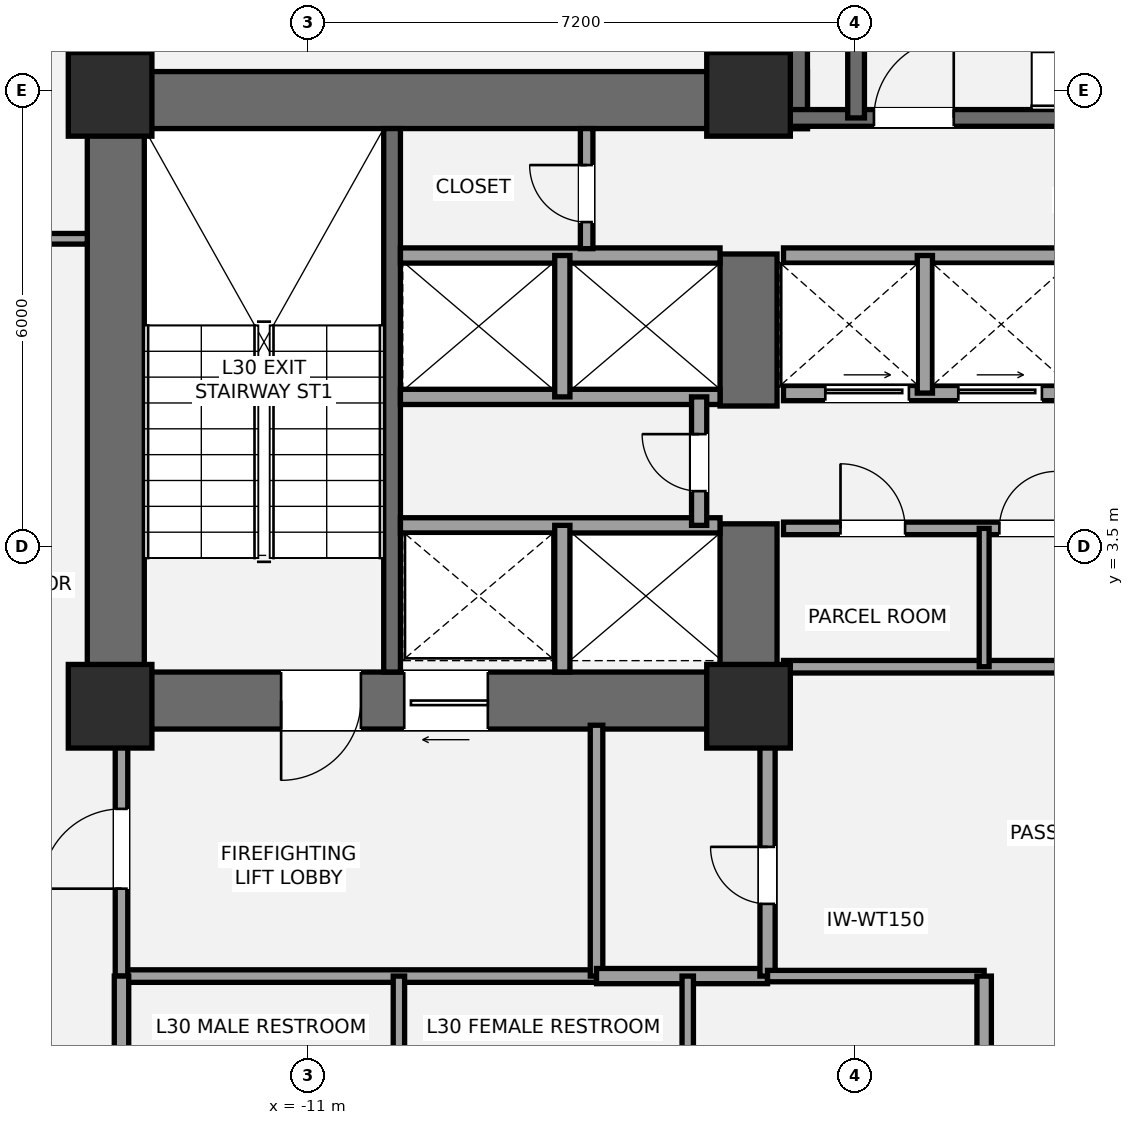
"""IFC4 building model, lengths in metres.
Left out: names, types, materials, properties, quantities, classifications, styles, units other than length and angle.
Written with IfcOpenShell. Run it as: python <this file> out.ifc"""

import sys

from ifc_helpers import new_model, si_unit, direction, frame, frame_2d, origin, origin_2d, place, context, subcontext, project, spatial, rectangle, extrude, element, fill, save


model = new_model("IFC4")
c1 = context("Model", 3, precision=1e-05, world=origin(), true_north=direction((0.0, 1.0)))
c2 = subcontext(c1, "Body", "Model", "MODEL_VIEW")
j1 = project(units=[si_unit("LENGTHUNIT", "METRE"), si_unit("PLANEANGLEUNIT", "RADIAN")], contexts=[c1])
p1 = place(None, origin())
s1 = spatial("IfcSite", under=j1, at=p1, CompositionType="ELEMENT")
p2 = place(p1, origin())
s2 = spatial("IfcBuilding", under=s1, at=p2, CompositionType="ELEMENT")
p3 = place(p2, frame((0.0, 0.0, 114.1)))
s3 = spatial("IfcBuildingStorey", under=s2, at=p3, CompositionType="ELEMENT", Elevation=114.1)
p4 = place(p3, frame((-13.525, 1.1, 0.0), z_axis=(0.0, 0.0, 1.0), x_axis=(0.0, 1.0, 0.0)))
e1 = element("IfcWall", 1, at=p4, inside=s3, PredefinedType="SHEAR", context=c2, shape_type="SweptSolid", body=[
    extrude(rectangle(XDim=8.65, YDim=0.75, at=frame_2d((4.325, 0.0))), origin(), (0.0, 0.0, 1.0), 3.5),
])
p5 = place(p3, frame((-13.9, 9.375, 0.0), z_axis=(0.0, 0.0, 1.0), x_axis=(1.0, 0.0, 0.0)))
e2 = element("IfcWall", 2, at=p5, inside=s3, PredefinedType="SHEAR", context=c2, shape_type="SweptSolid", body=[
    extrude(rectangle(XDim=9.475, YDim=0.75, at=frame_2d((4.737, 0.0))), origin(), (0.0, 0.0, 1.0), 3.5),
])
p6 = place(p3, frame((-4.825, 1.475, 0.0), z_axis=(0.0, 0.0, 1.0), x_axis=(-1.0, 0.0, 0.0)))
e3 = element("IfcWall", 3, at=p6, inside=s3, PredefinedType="SHEAR", context=c2, shape_type="SweptSolid", body=[
    extrude(rectangle(XDim=9.075, YDim=0.75, at=frame_2d((4.538, 0.0))), origin(), (0.0, 0.0, 1.0), 3.5),
])
p7 = place(p6, frame((5.475, 0.0, 0.0)))
e4 = element("IfcOpeningElement", 4, at=p7, cuts=e3, PredefinedType="OPENING", context=c2, shape_type="SweptSolid", body=[
    extrude(rectangle(XDim=1.05, YDim=2.15, at=frame_2d((0.525, 1.075))), frame((0.0, 0.385, 0.0), z_axis=(0.0, -1.0, 0.0), x_axis=(1.0, 0.0, 0.0)), (0.0, 0.0, 1.0), 0.77),
])
p8 = place(p6, frame((3.805, 0.0, 0.0)))
e5 = element("IfcOpeningElement", 5, at=p8, cuts=e3, PredefinedType="OPENING", context=c2, shape_type="SweptSolid", body=[
    extrude(rectangle(XDim=1.1, YDim=2.2, at=frame_2d((0.55, 1.1))), frame((0.0, 0.385, 0.0), z_axis=(0.0, -1.0, 0.0), x_axis=(1.0, 0.0, 0.0)), (0.0, 0.0, 1.0), 0.77),
])
p9 = place(p3, frame((-5.2, 1.1, 0.0), z_axis=(0.0, 0.0, 1.0), x_axis=(0.0, 1.0, 0.0)))
e6 = element("IfcWall", 6, at=p9, inside=s3, PredefinedType="SHEAR", context=c2, shape_type="SweptSolid", body=[
    extrude(rectangle(XDim=2.7, YDim=0.75, at=frame_2d((1.35, 0.0))), origin(), (0.0, 0.0, 1.0), 3.5),
])
p10 = place(p3, frame((-5.2, 5.35, 0.0), z_axis=(0.0, 0.0, 1.0), x_axis=(0.0, 1.0, 0.0)))
e7 = element("IfcWall", 7, at=p10, inside=s3, PredefinedType="SHEAR", context=c2, shape_type="SweptSolid", body=[
    extrude(rectangle(XDim=2.0, YDim=0.75, at=frame_2d((1.0, 0.0))), origin(), (0.0, 0.0, 1.0), 3.5),
])
p11 = place(p3, frame((-9.89, 1.85, 0.0), z_axis=(0.0, 0.0, 1.0), x_axis=(0.0, 1.0, 0.0)))
e8 = element("IfcWall", 8, at=p11, inside=s3, PredefinedType="SHEAR", context=c2, shape_type="SweptSolid", body=[
    extrude(rectangle(XDim=7.15, YDim=0.22, at=frame_2d((3.575, 0.0))), origin(), (0.0, 0.0, 1.0), 3.5),
])
p12 = place(p3, frame((-4.8, 9.0, 0.0), z_axis=(0.0, 0.0, 1.0), x_axis=(0.0, 1.0, 0.0)))
e9 = element("IfcWall", 9, at=p12, inside=s3, PredefinedType="SHEAR", context=c2, shape_type="SweptSolid", body=[
    extrude(rectangle(XDim=4.15, YDim=0.75, at=frame_2d((2.075, 0.0))), origin(), (0.0, 0.0, 1.0), 3.5),
])
p13 = place(p3, frame((-4.7, 9.14, 0.0), z_axis=(0.0, 0.0, 1.0), x_axis=(1.0, 0.0, 0.0)))
e10 = element("IfcWall", 10, at=p13, inside=s3, PredefinedType="SHEAR", context=c2, shape_type="SweptSolid", body=[
    extrude(rectangle(XDim=9.3, YDim=0.22, at=frame_2d((4.65, 0.0))), origin(), (0.0, 0.0, 1.0), 3.5),
])
p14 = place(p13, frame((1.15, 0.0, 0.0)))
e11 = element("IfcOpeningElement", 11, at=p14, cuts=e10, PredefinedType="OPENING", context=c2, shape_type="SweptSolid", body=[
    extrude(rectangle(XDim=1.05, YDim=2.15, at=frame_2d((0.525, 1.075))), frame((0.0, 0.12, 0.0), z_axis=(0.0, -1.0, 0.0), x_axis=(1.0, 0.0, 0.0)), (0.0, 0.0, 1.0), 0.24),
])
p15 = place(p3, frame((-3.785, 9.14, 0.0), z_axis=(0.0, 0.0, 1.0), x_axis=(0.0, 1.0, 0.0)))
e12 = element("IfcWall", 12, at=p15, inside=s3, PredefinedType="SHEAR", context=c2, shape_type="SweptSolid", body=[
    extrude(rectangle(XDim=3.26, YDim=0.22, at=frame_2d((1.63, 0.0))), origin(), (0.0, 0.0, 1.0), 3.5),
])
for number, where, z_axis, x_axis in (
    (13, (-13.6, 1.4, 0.0), (0.0, 0.0, 1.0), (1.0, 0.0, 0.0)),
    (14, (-13.6, 9.45, 0.0), (0.0, 0.0, 1.0), (1.0, 0.0, 0.0)),
    (15, (-5.2, 1.4, 0.0), (0.0, 0.0, 1.0), (1.0, 0.0, 0.0)),
    (16, (-5.2, 9.45, 0.0), (0.0, 0.0, 1.0), (1.0, 0.0, 0.0)),
):
    element("IfcColumn", number, at=place(p3, frame(where, z_axis=z_axis, x_axis=x_axis)), inside=s3, PredefinedType="COLUMN", context=c2, shape_type="SweptSolid", body=[
        extrude(rectangle(XDim=1.1, YDim=1.1, at=origin_2d()), origin(), (0.0, 0.0, 1.0), 3.5),
    ])
p16 = place(p3, frame((-13.45, -2.15, 0.0), z_axis=(0.0, 0.0, 1.0), x_axis=(1.0, 0.0, 0.0)))
e17 = element("IfcWall", 17, at=p16, inside=s3, PredefinedType="PARTITIONING", context=c2, shape_type="SweptSolid", body=[
    extrude(rectangle(XDim=6.25, YDim=0.165, at=frame_2d((3.125, 0.0))), origin(), (0.0, 0.0, 1.0), 3.31),
])
p17 = place(p3, frame((-13.45, -2.15, 0.0), z_axis=(0.0, 0.0, 1.0), x_axis=(0.0, 1.0, 0.0)))
e18 = element("IfcWall", 18, at=p17, inside=s3, PredefinedType="PARTITIONING", context=c2, shape_type="SweptSolid", body=[
    extrude(rectangle(XDim=3.3, YDim=0.165, at=frame_2d((1.65, 0.0))), origin(), (0.0, 0.0, 1.0), 2.763),
])
p18 = place(p17, frame((1.15, 0.0, 0.0)))
e19 = element("IfcOpeningElement", 19, at=p18, cuts=e18, PredefinedType="OPENING", context=c2, shape_type="SweptSolid", body=[
    extrude(rectangle(XDim=1.05, YDim=2.15, at=frame_2d((0.525, 1.075))), frame((0.0, 0.093, 0.0), z_axis=(0.0, -1.0, 0.0), x_axis=(1.0, 0.0, 0.0)), (0.0, 0.0, 1.0), 0.185),
])
p19 = place(p3, frame((-7.2, -2.15, 0.0), z_axis=(0.0, 0.0, 1.0), x_axis=(0.0, 1.0, 0.0)))
e20 = element("IfcWall", 20, at=p19, inside=s3, PredefinedType="PARTITIONING", context=c2, shape_type="SweptSolid", body=[
    extrude(rectangle(XDim=3.3, YDim=0.165, at=frame_2d((1.65, 0.0))), origin(), (0.0, 0.0, 1.0), 3.31),
])
p20 = place(p3, frame((-7.2, -2.15, 0.0), z_axis=(0.0, 0.0, 1.0), x_axis=(1.0, 0.0, 0.0)))
e21 = element("IfcWall", 21, at=p20, inside=s3, PredefinedType="SOLIDWALL", context=c2, shape_type="SweptSolid", body=[
    extrude(rectangle(XDim=2.25, YDim=0.2, at=frame_2d((1.125, 0.0))), origin(), (0.0, 0.0, 1.0), 3.31),
])
p21 = place(p3, frame((-4.95, -2.15, 0.0), z_axis=(0.0, 0.0, 1.0), x_axis=(0.0, 1.0, 0.0)))
e22 = element("IfcWall", 22, at=p21, inside=s3, PredefinedType="SOLIDWALL", context=c2, shape_type="SweptSolid", body=[
    extrude(rectangle(XDim=3.3, YDim=0.2, at=frame_2d((1.65, 0.0))), origin(), (0.0, 0.0, 1.0), 2.763),
])
p22 = place(p21, frame((0.95, 0.0, 0.0)))
e23 = element("IfcOpeningElement", 23, at=p22, cuts=e22, PredefinedType="OPENING", context=c2, shape_type="SweptSolid", body=[
    extrude(rectangle(XDim=0.75, YDim=2.1, at=frame_2d((0.375, 1.05))), frame((0.0, 0.11, 0.0), z_axis=(0.0, -1.0, 0.0), x_axis=(1.0, 0.0, 0.0)), (0.0, 0.0, 1.0), 0.22),
])
p23 = place(p3, frame((-9.78, 3.78, 0.0), z_axis=(0.0, 0.0, 1.0), x_axis=(1.0, 0.0, 0.0)))
e24 = element("IfcWall", 24, at=p23, inside=s3, PredefinedType="SOLIDWALL", context=c2, shape_type="SweptSolid", body=[
    extrude(rectangle(XDim=4.205, YDim=0.2, at=frame_2d((2.103, 0.0))), origin(), (0.0, 0.0, 1.0), 3.31),
])
p24 = place(p3, frame((-7.65, 1.85, 0.0), z_axis=(0.0, 0.0, 1.0), x_axis=(0.0, 1.0, 0.0)))
e25 = element("IfcWall", 25, at=p24, inside=s3, PredefinedType="SOLIDWALL", context=c2, shape_type="SweptSolid", body=[
    extrude(rectangle(XDim=1.93, YDim=0.2, at=frame_2d((0.965, 0.0))), origin(), (0.0, 0.0, 1.0), 3.31),
])
for number, where, z_axis, x_axis in (
    (26, (-9.78, 5.47, 0.0), (0.0, 0.0, 1.0), (1.0, 0.0, 0.0)),
    (27, (-9.78, 7.33, 0.0), (0.0, 0.0, 1.0), (1.0, 0.0, 0.0)),
):
    element("IfcWall", number, at=place(p3, frame(where, z_axis=z_axis, x_axis=x_axis)), inside=s3, PredefinedType="SOLIDWALL", context=c2, shape_type="SweptSolid", body=[
        extrude(rectangle(XDim=4.205, YDim=0.2, at=frame_2d((2.103, 0.0))), origin(), (0.0, 0.0, 1.0), 3.31),
    ])
p25 = place(p3, frame((-7.65, 5.47, 0.0), z_axis=(0.0, 0.0, 1.0), x_axis=(0.0, 1.0, 0.0)))
e28 = element("IfcWall", 28, at=p25, inside=s3, PredefinedType="SOLIDWALL", context=c2, shape_type="SweptSolid", body=[
    extrude(rectangle(XDim=1.86, YDim=0.2, at=frame_2d((0.93, 0.0))), origin(), (0.0, 0.0, 1.0), 3.31),
])
p26 = place(p3, frame((-5.85, 3.78, 0.0), z_axis=(0.0, 0.0, 1.0), x_axis=(0.0, 1.0, 0.0)))
e29 = element("IfcWall", 29, at=p26, inside=s3, PredefinedType="SOLIDWALL", context=c2, shape_type="SweptSolid", body=[
    extrude(rectangle(XDim=1.69, YDim=0.2, at=frame_2d((0.845, 0.0))), origin(), (0.0, 0.0, 1.0), 3.31),
])
p27 = place(p26, frame((0.45, 0.0, 0.0)))
e30 = element("IfcOpeningElement", 30, at=p27, cuts=e29, PredefinedType="OPENING", context=c2, shape_type="SweptSolid", body=[
    extrude(rectangle(XDim=0.75, YDim=2.1, at=frame_2d((0.375, 1.05))), frame((0.0, 0.11, 0.0), z_axis=(0.0, -1.0, 0.0), x_axis=(1.0, 0.0, 0.0)), (0.0, 0.0, 1.0), 0.22),
])
p28 = place(p3, frame((-4.74, 1.92, 0.0), z_axis=(0.0, 0.0, 1.0), x_axis=(1.0, 0.0, 0.0)))
e31 = element("IfcWall", 31, at=p28, inside=s3, PredefinedType="PARTITIONING", context=c2, shape_type="SweptSolid", body=[
    extrude(rectangle(XDim=3.89, YDim=0.165, at=frame_2d((1.945, 0.0))), origin(), (0.0, 0.0, 1.0), 2.3),
])
p29 = place(p3, frame((-4.74, 3.74, 0.0), z_axis=(0.0, 0.0, 1.0), x_axis=(1.0, 0.0, 0.0)))
e32 = element("IfcWall", 32, at=p29, inside=s3, PredefinedType="PARTITIONING", context=c2, shape_type="SweptSolid", body=[
    extrude(rectangle(XDim=3.89, YDim=0.165, at=frame_2d((1.945, 0.0))), origin(), (0.0, 0.0, 1.0), 3.31),
])
p30 = place(p29, frame((0.75, 0.0, 0.0)))
e33 = element("IfcOpeningElement", 33, at=p30, cuts=e32, PredefinedType="OPENING", context=c2, shape_type="SweptSolid", body=[
    extrude(rectangle(XDim=0.85, YDim=2.1, at=frame_2d((0.425, 1.05))), frame((0.0, 0.093, 0.0), z_axis=(0.0, -1.0, 0.0), x_axis=(1.0, 0.0, 0.0)), (0.0, 0.0, 1.0), 0.185),
])
p31 = place(p29, frame((2.84, 0.0, 0.0)))
e34 = element("IfcOpeningElement", 34, at=p31, cuts=e32, PredefinedType="OPENING", context=c2, shape_type="SweptSolid", body=[
    extrude(rectangle(XDim=0.75, YDim=2.1, at=frame_2d((0.375, 1.05))), frame((0.0, 0.093, 0.0), z_axis=(0.0, -1.0, 0.0), x_axis=(1.0, 0.0, 0.0)), (0.0, 0.0, 1.0), 0.185),
])
p32 = place(p3, frame((-2.1, 1.92, 0.0), z_axis=(0.0, 0.0, 1.0), x_axis=(0.0, 1.0, 0.0)))
e35 = element("IfcWall", 35, at=p32, inside=s3, PredefinedType="PARTITIONING", context=c2, shape_type="SweptSolid", body=[
    extrude(rectangle(XDim=1.82, YDim=0.13, at=frame_2d((0.91, 0.0))), origin(), (0.0, 0.0, 1.0), 3.31),
])
p33 = place(p3, frame((-4.74, 5.52, 0.0), z_axis=(0.0, 0.0, 1.0), x_axis=(1.0, 0.0, 0.0)))
e36 = element("IfcWall", 36, at=p33, inside=s3, PredefinedType="SOLIDWALL", context=c2, shape_type="SweptSolid", body=[
    extrude(rectangle(XDim=3.86, YDim=0.2, at=frame_2d((1.93, 0.0))), origin(), (0.0, 0.0, 1.0), 3.31),
])
p34 = place(p33, frame((0.55, 0.0, 0.0)))
e37 = element("IfcOpeningElement", 37, at=p34, cuts=e36, PredefinedType="OPENING", context=c2, shape_type="SweptSolid", body=[
    extrude(rectangle(XDim=1.1, YDim=2.2, at=frame_2d((0.55, 1.1))), frame((0.0, 0.11, 0.0), z_axis=(0.0, -1.0, 0.0), x_axis=(1.0, 0.0, 0.0)), (0.0, 0.0, 1.0), 0.22),
])
p35 = place(p33, frame((2.3, 0.0, 0.0)))
e38 = element("IfcOpeningElement", 38, at=p35, cuts=e36, PredefinedType="OPENING", context=c2, shape_type="SweptSolid", body=[
    extrude(rectangle(XDim=1.1, YDim=2.2, at=frame_2d((0.55, 1.1))), frame((0.0, 0.11, 0.0), z_axis=(0.0, -1.0, 0.0), x_axis=(1.0, 0.0, 0.0)), (0.0, 0.0, 1.0), 0.22),
])
p36 = place(p3, frame((-4.74, 7.33, 0.0), z_axis=(0.0, 0.0, 1.0), x_axis=(1.0, 0.0, 0.0)))
e39 = element("IfcWall", 39, at=p36, inside=s3, PredefinedType="SOLIDWALL", context=c2, shape_type="SweptSolid", body=[
    extrude(rectangle(XDim=3.86, YDim=0.2, at=frame_2d((1.93, 0.0))), origin(), (0.0, 0.0, 1.0), 3.31),
])
p37 = place(p3, frame((-2.88, 5.52, 0.0), z_axis=(0.0, 0.0, 1.0), x_axis=(0.0, 1.0, 0.0)))
e40 = element("IfcWall", 40, at=p37, inside=s3, PredefinedType="SOLIDWALL", context=c2, shape_type="SweptSolid", body=[
    extrude(rectangle(XDim=1.81, YDim=0.2, at=frame_2d((0.905, 0.0))), origin(), (0.0, 0.0, 1.0), 3.31),
])
p38 = place(p3, frame((-7.33, 7.42, 0.0), z_axis=(0.0, 0.0, 1.0), x_axis=(0.0, 1.0, 0.0)))
e41 = element("IfcWall", 41, at=p38, inside=s3, PredefinedType="PARTITIONING", context=c2, shape_type="SweptSolid", body=[
    extrude(rectangle(XDim=1.58, YDim=0.165, at=frame_2d((0.79, 0.0))), origin(), (0.0, 0.0, 1.0), 3.31),
])
p39 = place(p38, frame((0.35, 0.0, 0.0)))
e42 = element("IfcOpeningElement", 42, at=p39, cuts=e41, PredefinedType="OPENING", context=c2, shape_type="SweptSolid", body=[
    extrude(rectangle(XDim=0.75, YDim=2.1, at=frame_2d((0.375, 1.05))), frame((0.0, 0.093, 0.0), z_axis=(0.0, -1.0, 0.0), x_axis=(1.0, 0.0, 0.0)), (0.0, 0.0, 1.0), 0.185),
])
p40 = place(p3, frame((-4.95, -2.15, 0.0), z_axis=(0.0, 0.0, 1.0), x_axis=(1.0, 0.0, 0.0)))
e43 = element("IfcWall", 43, at=p40, inside=s3, PredefinedType="PLUMBINGWALL", context=c2, shape_type="SweptSolid", body=[
    extrude(rectangle(XDim=2.85, YDim=0.15, at=frame_2d((1.425, 0.0))), origin(), (0.0, 0.0, 1.0), 2.763),
])
p41 = place(p3, frame((-13.45, -4.05, 0.0), z_axis=(0.0, 0.0, 1.0), x_axis=(0.0, 1.0, 0.0)))
e44 = element("IfcWall", 44, at=p41, inside=s3, PredefinedType="PLUMBINGWALL", context=c2, shape_type="SweptSolid", body=[
    extrude(rectangle(XDim=1.9, YDim=0.19, at=frame_2d((0.95, 0.0))), origin(), (0.0, 0.0, 1.0), 2.763),
])
p42 = place(p3, frame((-2.1, -4.05, 0.0), z_axis=(0.0, 0.0, 1.0), x_axis=(0.0, 1.0, 0.0)))
e45 = element("IfcWall", 45, at=p42, inside=s3, PredefinedType="PLUMBINGWALL", context=c2, shape_type="SweptSolid", body=[
    extrude(rectangle(XDim=1.9, YDim=0.19, at=frame_2d((0.95, 0.0))), origin(), (0.0, 0.0, 1.0), 3.31),
])
p43 = place(p3, frame((-9.8, -4.05, 0.0), z_axis=(0.0, 0.0, 1.0), x_axis=(0.0, 1.0, 0.0)))
e46 = element("IfcWall", 46, at=p43, inside=s3, PredefinedType="PLUMBINGWALL", context=c2, shape_type="SweptSolid", body=[
    extrude(rectangle(XDim=1.9, YDim=0.15, at=frame_2d((0.95, 0.0))), origin(), (0.0, 0.0, 1.0), 3.31),
])
p44 = place(p3, frame((-6.0, -4.05, 0.0), z_axis=(0.0, 0.0, 1.0), x_axis=(0.0, 1.0, 0.0)))
e47 = element("IfcWall", 47, at=p44, inside=s3, PredefinedType="PLUMBINGWALL", context=c2, shape_type="SweptSolid", body=[
    extrude(rectangle(XDim=1.9, YDim=0.15, at=frame_2d((0.95, 0.0))), origin(), (0.0, 0.0, 1.0), 2.763),
])
p45 = place(p3, frame((-17.8, 7.55, 0.0), z_axis=(0.0, 0.0, 1.0), x_axis=(1.0, 0.0, 0.0)))
e48 = element("IfcWall", 48, at=p45, inside=s3, PredefinedType="PARTITIONING", context=c2, shape_type="SweptSolid", body=[
    extrude(rectangle(XDim=3.9, YDim=0.14, at=frame_2d((1.95, 0.0))), origin(), (0.0, 0.0, 1.0), 2.763),
])
p46 = place(p45, frame((0.32, 0.0, 0.0)))
e49 = element("IfcOpeningElement", 49, at=p46, cuts=e48, PredefinedType="OPENING", context=c2, shape_type="SweptSolid", body=[
    extrude(rectangle(XDim=0.92, YDim=2.15, at=frame_2d((0.46, 1.075))), frame((0.0, 0.08, 0.0), z_axis=(0.0, -1.0, 0.0), x_axis=(1.0, 0.0, 0.0)), (0.0, 0.0, 1.0), 0.16),
])
p47 = place(p7, origin())
e50 = element("IfcDoor", 50, at=p47, inside=s3, OperationType="SINGLE_SWING_RIGHT", PredefinedType="DOOR", context=c2, shape_type="SweptSolid", body=[
    extrude(rectangle(XDim=1.05, YDim=2.15, at=frame_2d((0.525, 1.075))), frame((0.0, 0.025, 0.0), z_axis=(0.0, -1.0, 0.0), x_axis=(1.0, 0.0, 0.0)), (0.0, 0.0, 1.0), 0.05),
])
fill(e4, e50)
p48 = place(p14, origin())
e51 = element("IfcDoor", 51, at=p48, inside=s3, OperationType="SINGLE_SWING_RIGHT", PredefinedType="DOOR", context=c2, shape_type="SweptSolid", body=[
    extrude(rectangle(XDim=1.05, YDim=2.15, at=frame_2d((0.525, 1.075))), frame((0.0, 0.025, 0.0), z_axis=(0.0, -1.0, 0.0), x_axis=(1.0, 0.0, 0.0)), (0.0, 0.0, 1.0), 0.05),
])
fill(e11, e51)
p49 = place(p18, origin())
e52 = element("IfcDoor", 52, at=p49, inside=s3, OperationType="SINGLE_SWING_LEFT", PredefinedType="DOOR", context=c2, shape_type="SweptSolid", body=[
    extrude(rectangle(XDim=1.05, YDim=2.15, at=frame_2d((0.525, 1.075))), frame((0.0, 0.025, 0.0), z_axis=(0.0, -1.0, 0.0), x_axis=(1.0, 0.0, 0.0)), (0.0, 0.0, 1.0), 0.05),
])
fill(e19, e52)
p50 = place(p22, origin())
e53 = element("IfcDoor", 53, at=p50, inside=s3, OperationType="SINGLE_SWING_RIGHT", PredefinedType="DOOR", context=c2, shape_type="SweptSolid", body=[
    extrude(rectangle(XDim=0.75, YDim=2.1, at=frame_2d((0.375, 1.05))), frame((0.0, 0.025, 0.0), z_axis=(0.0, -1.0, 0.0), x_axis=(1.0, 0.0, 0.0)), (0.0, 0.0, 1.0), 0.05),
])
fill(e23, e53)
p51 = place(p8, origin())
e54 = element("IfcDoor", 54, at=p51, inside=s3, OperationType="SLIDING_TO_LEFT", PredefinedType="DOOR", context=c2, shape_type="SweptSolid", body=[
    extrude(rectangle(XDim=1.1, YDim=2.2, at=frame_2d((0.55, 1.1))), frame((0.0, 0.025, 0.0), z_axis=(0.0, -1.0, 0.0), x_axis=(1.0, 0.0, 0.0)), (0.0, 0.0, 1.0), 0.05),
])
fill(e5, e54)
p52 = place(p27, origin())
e55 = element("IfcDoor", 55, at=p52, inside=s3, OperationType="SINGLE_SWING_RIGHT", PredefinedType="DOOR", context=c2, shape_type="SweptSolid", body=[
    extrude(rectangle(XDim=0.75, YDim=2.1, at=frame_2d((0.375, 1.05))), frame((0.0, 0.025, 0.0), z_axis=(0.0, -1.0, 0.0), x_axis=(1.0, 0.0, 0.0)), (0.0, 0.0, 1.0), 0.05),
])
fill(e30, e55)
p53 = place(p30, origin())
e56 = element("IfcDoor", 56, at=p53, inside=s3, OperationType="SINGLE_SWING_LEFT", PredefinedType="DOOR", context=c2, shape_type="SweptSolid", body=[
    extrude(rectangle(XDim=0.85, YDim=2.1, at=frame_2d((0.425, 1.05))), frame((0.0, 0.025, 0.0), z_axis=(0.0, -1.0, 0.0), x_axis=(1.0, 0.0, 0.0)), (0.0, 0.0, 1.0), 0.05),
])
fill(e33, e56)
p54 = place(p31, origin())
e57 = element("IfcDoor", 57, at=p54, inside=s3, OperationType="SINGLE_SWING_RIGHT", PredefinedType="DOOR", context=c2, shape_type="SweptSolid", body=[
    extrude(rectangle(XDim=0.75, YDim=2.1, at=frame_2d((0.375, 1.05))), frame((0.0, 0.025, 0.0), z_axis=(0.0, -1.0, 0.0), x_axis=(1.0, 0.0, 0.0)), (0.0, 0.0, 1.0), 0.05),
])
fill(e34, e57)
p55 = place(p34, origin())
e58 = element("IfcDoor", 58, at=p55, inside=s3, OperationType="SLIDING_TO_LEFT", PredefinedType="DOOR", context=c2, shape_type="SweptSolid", body=[
    extrude(rectangle(XDim=1.1, YDim=2.2, at=frame_2d((0.55, 1.1))), frame((0.0, 0.025, 0.0), z_axis=(0.0, -1.0, 0.0), x_axis=(1.0, 0.0, 0.0)), (0.0, 0.0, 1.0), 0.05),
])
fill(e37, e58)
p56 = place(p35, origin())
e59 = element("IfcDoor", 59, at=p56, inside=s3, OperationType="SLIDING_TO_LEFT", PredefinedType="DOOR", context=c2, shape_type="SweptSolid", body=[
    extrude(rectangle(XDim=1.1, YDim=2.2, at=frame_2d((0.55, 1.1))), frame((0.0, 0.025, 0.0), z_axis=(0.0, -1.0, 0.0), x_axis=(1.0, 0.0, 0.0)), (0.0, 0.0, 1.0), 0.05),
])
fill(e38, e59)
p57 = place(p39, origin())
e60 = element("IfcDoor", 60, at=p57, inside=s3, OperationType="SINGLE_SWING_RIGHT", PredefinedType="DOOR", context=c2, shape_type="SweptSolid", body=[
    extrude(rectangle(XDim=0.75, YDim=2.1, at=frame_2d((0.375, 1.05))), frame((0.0, 0.025, 0.0), z_axis=(0.0, -1.0, 0.0), x_axis=(1.0, 0.0, 0.0)), (0.0, 0.0, 1.0), 0.05),
])
fill(e42, e60)
save(model, sys.argv[1])
